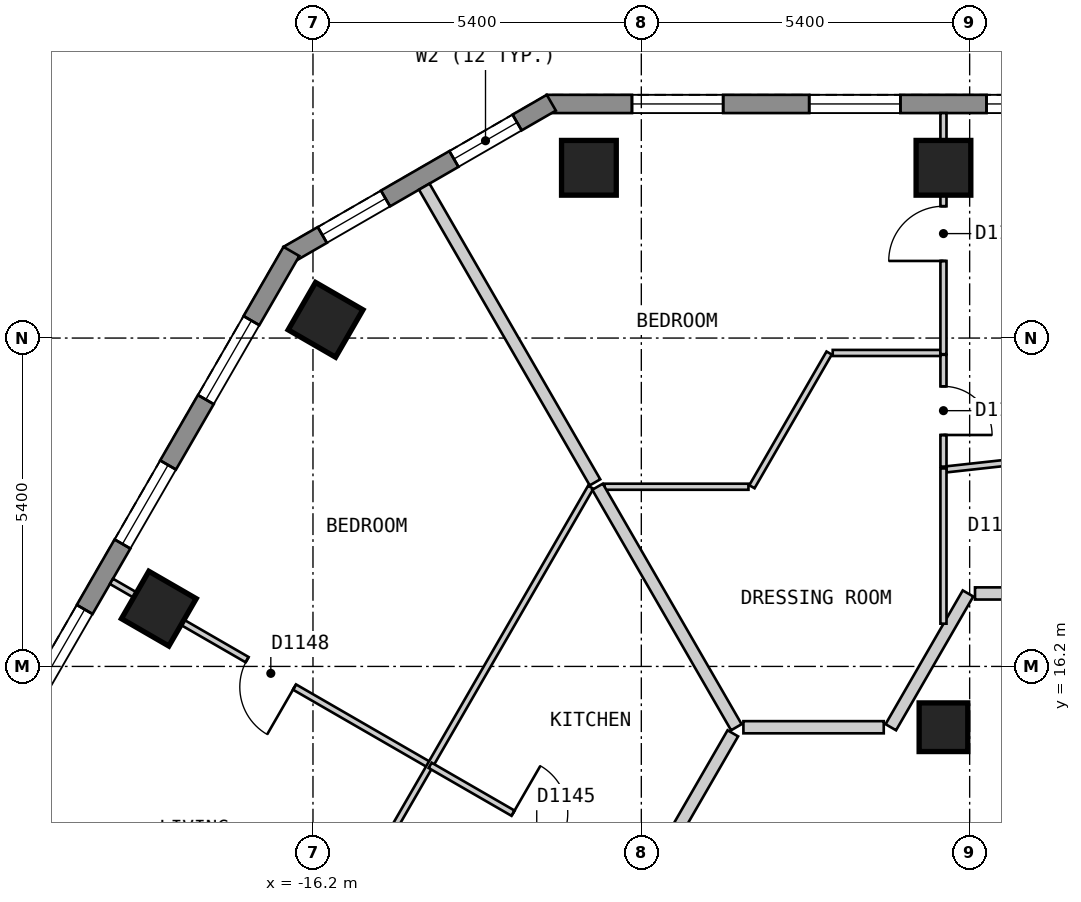
"""IFC4 building model, lengths in metres.
Left out: names, types, materials, properties, quantities, classifications, styles, units other than length and angle.
Written with IfcOpenShell. Run it as: python <this file> out.ifc"""

import sys

from ifc_helpers import new_model, si_unit, direction, frame, frame_2d, origin, origin_2d, place, context, subcontext, project, spatial, polyline, rectangle, outline, extrude, element, fill, save


model = new_model("IFC4")
c1 = context("Model", 3, precision=1e-05, world=origin(), true_north=direction((0.0, 1.0)))
c2 = subcontext(c1, "Body", "Model", "MODEL_VIEW")
j1 = project(units=[si_unit("LENGTHUNIT", "METRE"), si_unit("PLANEANGLEUNIT", "RADIAN")], contexts=[c1])
p1 = place(None, origin())
s1 = spatial("IfcSite", under=j1, at=p1, CompositionType="ELEMENT")
p2 = place(p1, origin())
s2 = spatial("IfcBuilding", under=s1, at=p2, CompositionType="ELEMENT")
p3 = place(p2, frame((0.0, 0.0, 138.6)))
s3 = spatial("IfcBuildingStorey", under=s2, at=p3, CompositionType="ELEMENT", Elevation=138.6)
for number, where, z_axis, x_axis in (
    (1, (-5.831, 24.4, 0.0), (0.0, 0.0, 1.0), (-1.0, 0.0, 0.0)),
    (2, (-11.662, 24.4, 0.0), (0.0, 0.0, 1.0), (-1.0, 0.0, 0.0)),
    (3, (-15.993, 21.9, 0.0), (0.0, 0.0, 1.0), (-0.5, -0.866, 0.0)),
    (4, (-18.735, 17.15, 0.0), (0.0, 0.0, 1.0), (-0.5, -0.866, 0.0)),
):
    element("IfcColumn", number, at=place(p3, frame(where, z_axis=z_axis, x_axis=x_axis)), inside=s3, PredefinedType="COLUMN", context=c2, shape_type="SweptSolid", body=[
        extrude(rectangle(XDim=0.9, YDim=0.9, at=origin_2d()), origin(), (0.0, 0.0, 1.0), 3.0),
    ])
p4 = place(p3, frame((-5.831, 15.2, 0.0), z_axis=(0.0, 0.0, 1.0), x_axis=(-1.0, 0.0, 0.0)))
e5 = element("IfcColumn", 5, at=p4, inside=s3, PredefinedType="COLUMN", context=c2, shape_type="SweptSolid", body=[
    extrude(rectangle(XDim=0.8, YDim=0.8, at=origin_2d()), origin(), (0.0, 0.0, 1.0), 3.0),
])
p5 = place(p3, frame((12.355, 25.45, 0.0), z_axis=(0.0, 0.0, 1.0), x_axis=(-1.0, 0.0, 0.0)))
e6 = element("IfcWall", 6, at=p5, inside=s3, PredefinedType="SOLIDWALL", context=c2, shape_type="SweptSolid", body=[
    extrude(outline(polyline([(0.0, -0.15), (24.71, -0.15), (24.63, 0.15), (0.08, 0.15), (0.0, -0.15)])), origin(), (0.0, 0.0, 1.0), 2.7),
])
p6 = place(p5, frame((1.401, 0.0, 0.15)))
e7 = element("IfcOpeningElement", 7, at=p6, cuts=e6, PredefinedType="OPENING", context=c2, shape_type="SweptSolid", body=[
    extrude(rectangle(XDim=1.5, YDim=2.1, at=frame_2d((0.75, 1.05))), frame((0.0, 0.16, 0.0), z_axis=(0.0, -1.0, 0.0), x_axis=(1.0, 0.0, 0.0)), (0.0, 0.0, 1.0), 0.32),
])
p7 = place(p5, frame((4.316, 0.0, 0.15)))
e8 = element("IfcOpeningElement", 8, at=p7, cuts=e6, PredefinedType="OPENING", context=c2, shape_type="SweptSolid", body=[
    extrude(rectangle(XDim=1.5, YDim=2.1, at=frame_2d((0.75, 1.05))), frame((0.0, 0.16, 0.0), z_axis=(0.0, -1.0, 0.0), x_axis=(1.0, 0.0, 0.0)), (0.0, 0.0, 1.0), 0.32),
])
p8 = place(p5, frame((7.232, 0.0, 0.15)))
e9 = element("IfcOpeningElement", 9, at=p8, cuts=e6, PredefinedType="OPENING", context=c2, shape_type="SweptSolid", body=[
    extrude(rectangle(XDim=1.5, YDim=2.1, at=frame_2d((0.75, 1.05))), frame((0.0, 0.16, 0.0), z_axis=(0.0, -1.0, 0.0), x_axis=(1.0, 0.0, 0.0)), (0.0, 0.0, 1.0), 0.32),
])
p9 = place(p5, frame((10.147, 0.0, 0.15)))
e10 = element("IfcOpeningElement", 10, at=p9, cuts=e6, PredefinedType="OPENING", context=c2, shape_type="SweptSolid", body=[
    extrude(rectangle(XDim=1.5, YDim=2.1, at=frame_2d((0.75, 1.05))), frame((0.0, 0.16, 0.0), z_axis=(0.0, -1.0, 0.0), x_axis=(1.0, 0.0, 0.0)), (0.0, 0.0, 1.0), 0.32),
])
p10 = place(p5, frame((13.063, 0.0, 0.15)))
e11 = element("IfcOpeningElement", 11, at=p10, cuts=e6, PredefinedType="OPENING", context=c2, shape_type="SweptSolid", body=[
    extrude(rectangle(XDim=1.5, YDim=2.1, at=frame_2d((0.75, 1.05))), frame((0.0, 0.16, 0.0), z_axis=(0.0, -1.0, 0.0), x_axis=(1.0, 0.0, 0.0)), (0.0, 0.0, 1.0), 0.32),
])
p11 = place(p5, frame((15.978, 0.0, 0.15)))
e12 = element("IfcOpeningElement", 12, at=p11, cuts=e6, PredefinedType="OPENING", context=c2, shape_type="SweptSolid", body=[
    extrude(rectangle(XDim=1.5, YDim=2.1, at=frame_2d((0.75, 1.05))), frame((0.0, 0.16, 0.0), z_axis=(0.0, -1.0, 0.0), x_axis=(1.0, 0.0, 0.0)), (0.0, 0.0, 1.0), 0.32),
])
p12 = place(p5, frame((18.894, 0.0, 0.15)))
e13 = element("IfcOpeningElement", 13, at=p12, cuts=e6, PredefinedType="OPENING", context=c2, shape_type="SweptSolid", body=[
    extrude(rectangle(XDim=1.5, YDim=2.1, at=frame_2d((0.75, 1.05))), frame((0.0, 0.16, 0.0), z_axis=(0.0, -1.0, 0.0), x_axis=(1.0, 0.0, 0.0)), (0.0, 0.0, 1.0), 0.32),
])
p13 = place(p5, frame((21.809, 0.0, 0.15)))
e14 = element("IfcOpeningElement", 14, at=p13, cuts=e6, PredefinedType="OPENING", context=c2, shape_type="SweptSolid", body=[
    extrude(rectangle(XDim=1.5, YDim=2.1, at=frame_2d((0.75, 1.05))), frame((0.0, 0.16, 0.0), z_axis=(0.0, -1.0, 0.0), x_axis=(1.0, 0.0, 0.0)), (0.0, 0.0, 1.0), 0.32),
])
p14 = place(p3, frame((-12.28, 25.47, 0.0), z_axis=(0.0, 0.0, 1.0), x_axis=(-0.866022959057, -0.500004234368, 0.0)))
e15 = element("IfcWall", 15, at=p14, inside=s3, PredefinedType="SOLIDWALL", context=c2, shape_type="SweptSolid", body=[
    extrude(outline(polyline([(0.0, -0.15), (5.0, -0.15), (4.92, 0.15), (0.08, 0.15), (0.0, -0.15)])), origin(), (0.0, 0.0, 1.0), 2.7),
])
p15 = place(p14, frame((0.65, 0.0, 0.15)))
e16 = element("IfcOpeningElement", 16, at=p15, cuts=e15, PredefinedType="OPENING", context=c2, shape_type="SweptSolid", body=[
    extrude(rectangle(XDim=1.2, YDim=2.1, at=frame_2d((0.6, 1.05))), frame((0.0, 0.16, 0.0), z_axis=(0.0, -1.0, 0.0), x_axis=(1.0, 0.0, 0.0)), (0.0, 0.0, 1.0), 0.32),
])
p16 = place(p14, frame((3.149, 0.0, 0.15)))
e17 = element("IfcOpeningElement", 17, at=p16, cuts=e15, PredefinedType="OPENING", context=c2, shape_type="SweptSolid", body=[
    extrude(rectangle(XDim=1.2, YDim=2.1, at=frame_2d((0.6, 1.05))), frame((0.0, 0.16, 0.0), z_axis=(0.0, -1.0, 0.0), x_axis=(1.0, 0.0, 0.0)), (0.0, 0.0, 1.0), 0.32),
])
p17 = place(p3, frame((-16.555, 23.025, 0.0), z_axis=(0.0, 0.0, 1.0), x_axis=(-0.500020536353, -0.866013546791, 0.0)))
e18 = element("IfcWall", 18, at=p17, inside=s3, PredefinedType="SOLIDWALL", context=c2, shape_type="SweptSolid", body=[
    extrude(outline(polyline([(0.0, -0.15), (23.325, -0.15), (23.245, 0.15), (0.08, 0.15), (0.0, -0.15)])), origin(), (0.0, 0.0, 1.0), 2.7),
])
p18 = place(p17, frame((1.314, 0.0, 0.15)))
e19 = element("IfcOpeningElement", 19, at=p18, cuts=e18, PredefinedType="OPENING", context=c2, shape_type="SweptSolid", body=[
    extrude(rectangle(XDim=1.5, YDim=2.1, at=frame_2d((0.75, 1.05))), frame((0.0, 0.16, 0.0), z_axis=(0.0, -1.0, 0.0), x_axis=(1.0, 0.0, 0.0)), (0.0, 0.0, 1.0), 0.32),
])
p19 = place(p17, frame((4.056, 0.0, 0.15)))
e20 = element("IfcOpeningElement", 20, at=p19, cuts=e18, PredefinedType="OPENING", context=c2, shape_type="SweptSolid", body=[
    extrude(rectangle(XDim=1.5, YDim=2.1, at=frame_2d((0.75, 1.05))), frame((0.0, 0.16, 0.0), z_axis=(0.0, -1.0, 0.0), x_axis=(1.0, 0.0, 0.0)), (0.0, 0.0, 1.0), 0.32),
])
p20 = place(p17, frame((6.799, 0.0, 0.15)))
e21 = element("IfcOpeningElement", 21, at=p20, cuts=e18, PredefinedType="OPENING", context=c2, shape_type="SweptSolid", body=[
    extrude(rectangle(XDim=1.5, YDim=2.1, at=frame_2d((0.75, 1.05))), frame((0.0, 0.16, 0.0), z_axis=(0.0, -1.0, 0.0), x_axis=(1.0, 0.0, 0.0)), (0.0, 0.0, 1.0), 0.32),
])
p21 = place(p17, frame((9.541, 0.0, 0.15)))
e22 = element("IfcOpeningElement", 22, at=p21, cuts=e18, PredefinedType="OPENING", context=c2, shape_type="SweptSolid", body=[
    extrude(rectangle(XDim=1.5, YDim=2.1, at=frame_2d((0.75, 1.05))), frame((0.0, 0.16, 0.0), z_axis=(0.0, -1.0, 0.0), x_axis=(1.0, 0.0, 0.0)), (0.0, 0.0, 1.0), 0.32),
])
p22 = place(p17, frame((12.285, 0.0, 0.15)))
e23 = element("IfcOpeningElement", 23, at=p22, cuts=e18, PredefinedType="OPENING", context=c2, shape_type="SweptSolid", body=[
    extrude(rectangle(XDim=1.5, YDim=2.1, at=frame_2d((0.75, 1.05))), frame((0.0, 0.16, 0.0), z_axis=(0.0, -1.0, 0.0), x_axis=(1.0, 0.0, 0.0)), (0.0, 0.0, 1.0), 0.32),
])
p23 = place(p17, frame((15.027, 0.0, 0.15)))
e24 = element("IfcOpeningElement", 24, at=p23, cuts=e18, PredefinedType="OPENING", context=c2, shape_type="SweptSolid", body=[
    extrude(rectangle(XDim=1.5, YDim=2.1, at=frame_2d((0.75, 1.05))), frame((0.0, 0.16, 0.0), z_axis=(0.0, -1.0, 0.0), x_axis=(1.0, 0.0, 0.0)), (0.0, 0.0, 1.0), 0.32),
])
p24 = place(p17, frame((17.769, 0.0, 0.15)))
e25 = element("IfcOpeningElement", 25, at=p24, cuts=e18, PredefinedType="OPENING", context=c2, shape_type="SweptSolid", body=[
    extrude(rectangle(XDim=1.5, YDim=2.1, at=frame_2d((0.75, 1.05))), frame((0.0, 0.16, 0.0), z_axis=(0.0, -1.0, 0.0), x_axis=(1.0, 0.0, 0.0)), (0.0, 0.0, 1.0), 0.32),
])
p25 = place(p17, frame((20.512, 0.0, 0.15)))
e26 = element("IfcOpeningElement", 26, at=p25, cuts=e18, PredefinedType="OPENING", context=c2, shape_type="SweptSolid", body=[
    extrude(rectangle(XDim=1.5, YDim=2.1, at=frame_2d((0.75, 1.05))), frame((0.0, 0.16, 0.0), z_axis=(0.0, -1.0, 0.0), x_axis=(1.0, 0.0, 0.0)), (0.0, 0.0, 1.0), 0.32),
])
p26 = place(p3, frame((-9.121, 15.2, 0.0), z_axis=(0.0, 0.0, 1.0), x_axis=(1.0, 0.0, 0.0)))
e27 = element("IfcWall", 27, at=p26, inside=s3, PredefinedType="PARTITIONING", context=c2, shape_type="SweptSolid", body=[
    extrude(rectangle(XDim=2.308, YDim=0.2, at=frame_2d((1.154, 0.0))), origin(), (0.0, 0.0, 1.0), 2.7),
])
p27 = place(p3, frame((-5.312, 17.4, 0.0), z_axis=(0.0, 0.0, 1.0), x_axis=(1.0, 0.0, 0.0)))
e28 = element("IfcWall", 28, at=p27, inside=s3, PredefinedType="PARTITIONING", context=c2, shape_type="SweptSolid", body=[
    extrude(rectangle(XDim=10.739, YDim=0.2, at=frame_2d((5.37, 0.0))), origin(), (0.0, 0.0, 1.0), 2.7),
])
p28 = place(p27, frame((7.538, 0.0, 0.0)))
e29 = element("IfcOpeningElement", 29, at=p28, cuts=e28, PredefinedType="OPENING", context=c2, shape_type="SweptSolid", body=[
    extrude(rectangle(XDim=1.0, YDim=2.1, at=frame_2d((0.5, 1.05))), frame((0.0, 0.11, 0.0), z_axis=(0.0, -1.0, 0.0), x_axis=(1.0, 0.0, 0.0)), (0.0, 0.0, 1.0), 0.22),
])
p29 = place(p27, frame((1.864, 0.0, 0.0)))
e30 = element("IfcOpeningElement", 30, at=p29, cuts=e28, PredefinedType="OPENING", context=c2, shape_type="SweptSolid", body=[
    extrude(rectangle(XDim=1.0, YDim=2.1, at=frame_2d((0.5, 1.05))), frame((0.0, 0.11, 0.0), z_axis=(0.0, -1.0, 0.0), x_axis=(1.0, 0.0, 0.0)), (0.0, 0.0, 1.0), 0.22),
])
p30 = place(p3, frame((-6.697, 15.2, 0.0), z_axis=(0.0, 0.0, 1.0), x_axis=(0.499963722229, 0.866046347752, 0.0)))
e31 = element("IfcWall", 31, at=p30, inside=s3, PredefinedType="PARTITIONING", context=c2, shape_type="SweptSolid", body=[
    extrude(rectangle(XDim=2.54, YDim=0.2, at=frame_2d((1.27, 0.0))), origin(), (0.0, 0.0, 1.0), 2.7),
])
p31 = place(p3, frame((-17.724, 0.5, 0.0), z_axis=(0.0, 0.0, 1.0), x_axis=(0.499992388462, 0.866029798263, 0.0)))
e32 = element("IfcWall", 32, at=p31, inside=s3, PredefinedType="PARTITIONING", context=c2, shape_type="SweptSolid", body=[
    extrude(rectangle(XDim=16.859, YDim=0.2, at=frame_2d((8.429, 0.0))), origin(), (0.0, 0.0, 1.0), 2.7),
])
p32 = place(p31, frame((10.672, 0.0, 0.0)))
e33 = element("IfcOpeningElement", 33, at=p32, cuts=e32, PredefinedType="OPENING", context=c2, shape_type="SweptSolid", body=[
    extrude(rectangle(XDim=1.0, YDim=2.1, at=frame_2d((0.5, 1.05))), frame((0.0, 0.11, 0.0), z_axis=(0.0, -1.0, 0.0), x_axis=(1.0, 0.0, 0.0)), (0.0, 0.0, 1.0), 0.22),
])
p33 = place(p3, frame((-5.831, 21.325, 0.0), z_axis=(0.0, 0.0, 1.0), x_axis=(0.0, -1.0, 0.0)))
e34 = element("IfcWall", 34, at=p33, inside=s3, PredefinedType="PARTITIONING", context=c2, shape_type="SweptSolid", body=[
    extrude(rectangle(XDim=1.839, YDim=0.1, at=frame_2d((0.919, 0.0))), origin(), (0.0, 0.0, 1.0), 2.7),
])
p34 = place(p33, frame((0.519, 0.0, 0.0)))
e35 = element("IfcOpeningElement", 35, at=p34, cuts=e34, PredefinedType="OPENING", context=c2, shape_type="SweptSolid", body=[
    extrude(rectangle(XDim=0.8, YDim=2.1, at=frame_2d((0.4, 1.05))), frame((0.0, 0.06, 0.0), z_axis=(0.0, -1.0, 0.0), x_axis=(1.0, 0.0, 0.0)), (0.0, 0.0, 1.0), 0.12),
])
p35 = place(p3, frame((-19.514, 17.599, 0.0), z_axis=(0.0, 0.0, 1.0), x_axis=(0.866007554612, -0.500030914399, 0.0)))
e36 = element("IfcWall", 36, at=p35, inside=s3, PredefinedType="PARTITIONING", context=c2, shape_type="SweptSolid", body=[
    extrude(rectangle(XDim=6.052, YDim=0.1, at=frame_2d((3.026, 0.0))), origin(), (0.0, 0.0, 1.0), 2.7),
])
p36 = place(p35, frame((2.576, 0.0, 0.0)))
e37 = element("IfcOpeningElement", 37, at=p36, cuts=e36, PredefinedType="OPENING", context=c2, shape_type="SweptSolid", body=[
    extrude(rectangle(XDim=0.9, YDim=2.1, at=frame_2d((0.45, 1.05))), frame((0.0, 0.06, 0.0), z_axis=(0.0, -1.0, 0.0), x_axis=(1.0, 0.0, 0.0)), (0.0, 0.0, 1.0), 0.12),
])
p37 = place(p3, frame((-11.405, 19.155, 0.0), z_axis=(0.0, 0.0, 1.0), x_axis=(1.0, 0.0, 0.0)))
e38 = element("IfcWall", 38, at=p37, inside=s3, PredefinedType="PARTITIONING", context=c2, shape_type="SweptSolid", body=[
    extrude(rectangle(XDim=2.367, YDim=0.1, at=frame_2d((1.184, 0.0))), origin(), (0.0, 0.0, 1.0), 2.7),
])
p38 = place(p3, frame((-7.652, 21.355, 0.0), z_axis=(0.0, 0.0, 1.0), x_axis=(1.0, 0.0, 0.0)))
e39 = element("IfcWall", 39, at=p38, inside=s3, PredefinedType="PARTITIONING", context=c2, shape_type="SweptSolid", body=[
    extrude(rectangle(XDim=1.771, YDim=0.1, at=frame_2d((0.885, 0.0))), origin(), (0.0, 0.0, 1.0), 2.7),
])
p39 = place(p3, frame((-8.981, 19.155, 0.0), z_axis=(0.0, 0.0, 1.0), x_axis=(0.500130227609, 0.865950203783, 0.0)))
e40 = element("IfcWall", 40, at=p39, inside=s3, PredefinedType="PARTITIONING", context=c2, shape_type="SweptSolid", body=[
    extrude(rectangle(XDim=2.539, YDim=0.1, at=frame_2d((1.27, 0.0))), origin(), (0.0, 0.0, 1.0), 2.7),
])
p40 = place(p3, frame((-22.398, 0.499, 0.0), z_axis=(0.0, 0.0, 1.0), x_axis=(0.499981561717, 0.866036048871, 0.0)))
e41 = element("IfcWall", 41, at=p40, inside=s3, PredefinedType="PARTITIONING", context=c2, shape_type="SweptSolid", body=[
    extrude(rectangle(XDim=21.532, YDim=0.1, at=frame_2d((10.766, 0.0))), origin(), (0.0, 0.0, 1.0), 2.7),
])
p41 = place(p40, frame((13.049, 0.0, 0.0)))
e42 = element("IfcOpeningElement", 42, at=p41, cuts=e41, PredefinedType="OPENING", context=c2, shape_type="SweptSolid", body=[
    extrude(rectangle(XDim=0.9, YDim=2.1, at=frame_2d((0.45, 1.05))), frame((0.0, 0.06, 0.0), z_axis=(0.0, -1.0, 0.0), x_axis=(1.0, 0.0, 0.0)), (0.0, 0.0, 1.0), 0.12),
])
p42 = place(p40, frame((2.183, 0.0, 0.0)))
e43 = element("IfcOpeningElement", 43, at=p42, cuts=e41, PredefinedType="OPENING", context=c2, shape_type="SweptSolid", body=[
    extrude(rectangle(XDim=0.8, YDim=2.1, at=frame_2d((0.4, 1.05))), frame((0.0, 0.06, 0.0), z_axis=(0.0, -1.0, 0.0), x_axis=(1.0, 0.0, 0.0)), (0.0, 0.0, 1.0), 0.12),
])
p43 = place(p3, frame((-5.781, 19.441, 0.0), z_axis=(0.0, 0.0, 1.0), x_axis=(0.994005576935, 0.109329378588, 0.0)))
e44 = element("IfcWall", 44, at=p43, inside=s3, PredefinedType="PARTITIONING", context=c2, shape_type="SweptSolid", body=[
    extrude(rectangle(XDim=3.477, YDim=0.1, at=frame_2d((1.738, 0.0))), origin(), (0.0, 0.0, 1.0), 2.7),
])
p44 = place(p3, frame((-5.831, 16.903, 0.0), z_axis=(0.0, 0.0, 1.0), x_axis=(0.0, 1.0, 0.0)))
e45 = element("IfcWall", 45, at=p44, inside=s3, PredefinedType="PARTITIONING", context=c2, shape_type="SweptSolid", body=[
    extrude(rectangle(XDim=2.553, YDim=0.1, at=frame_2d((1.276, 0.0))), origin(), (0.0, 0.0, 1.0), 2.7),
])
p45 = place(p3, frame((-5.831, 21.335, 0.0), z_axis=(0.0, 0.0, 1.0), x_axis=(0.0, 1.0, 0.0)))
e46 = element("IfcWall", 46, at=p45, inside=s3, PredefinedType="PARTITIONING", context=c2, shape_type="SweptSolid", body=[
    extrude(rectangle(XDim=3.965, YDim=0.1, at=frame_2d((1.982, 0.0))), origin(), (0.0, 0.0, 1.0), 2.7),
])
p46 = place(p45, frame((1.533, 0.0, 0.0)))
e47 = element("IfcOpeningElement", 47, at=p46, cuts=e46, PredefinedType="OPENING", context=c2, shape_type="SweptSolid", body=[
    extrude(rectangle(XDim=0.9, YDim=2.1, at=frame_2d((0.45, 1.05))), frame((0.0, 0.06, 0.0), z_axis=(0.0, -1.0, 0.0), x_axis=(1.0, 0.0, 0.0)), (0.0, 0.0, 1.0), 0.12),
])
p47 = place(p3, frame((-14.37, 24.09, 0.0), z_axis=(0.0, 0.0, 1.0), x_axis=(0.500057386422, -0.865992269183, 0.0)))
e48 = element("IfcWall", 48, at=p47, inside=s3, PredefinedType="PARTITIONING", context=c2, shape_type="SweptSolid", body=[
    extrude(rectangle(XDim=5.615, YDim=0.2, at=frame_2d((2.808, 0.0))), origin(), (0.0, 0.0, 1.0), 2.7),
])
p48 = place(p3, frame((-11.52, 19.155, 0.0), z_axis=(0.0, 0.0, 1.0), x_axis=(0.499916824138, -0.866073420066, 0.0)))
e49 = element("IfcWall", 49, at=p48, inside=s3, PredefinedType="PARTITIONING", context=c2, shape_type="SweptSolid", body=[
    extrude(rectangle(XDim=4.567, YDim=0.2, at=frame_2d((2.283, 0.0))), origin(), (0.0, 0.0, 1.0), 2.7),
])
p49 = place(p3, frame((-14.273, 14.573, 0.0), z_axis=(0.0, 0.0, 1.0), x_axis=(0.866138216955, -0.499804550929, 0.0)))
e50 = element("IfcWall", 50, at=p49, inside=s3, PredefinedType="PARTITIONING", context=c2, shape_type="SweptSolid", body=[
    extrude(rectangle(XDim=3.947, YDim=0.1, at=frame_2d((1.974, 0.0))), origin(), (0.0, 0.0, 1.0), 2.7),
])
p50 = place(p49, frame((1.574, 0.0, 0.0)))
e51 = element("IfcOpeningElement", 51, at=p50, cuts=e50, PredefinedType="OPENING", context=c2, shape_type="SweptSolid", body=[
    extrude(rectangle(XDim=0.9, YDim=2.1, at=frame_2d((0.45, 1.05))), frame((0.0, 0.06, 0.0), z_axis=(0.0, -1.0, 0.0), x_axis=(1.0, 0.0, 0.0)), (0.0, 0.0, 1.0), 0.12),
])
p51 = place(p11, origin())
e52 = element("IfcWindow", 52, at=p51, inside=s3, PartitioningType="SINGLE_PANEL", PredefinedType="WINDOW", context=c2, shape_type="SweptSolid", body=[
    extrude(rectangle(XDim=1.5, YDim=2.1, at=frame_2d((0.75, 1.05))), frame((0.0, 0.03, 0.0), z_axis=(0.0, -1.0, 0.0), x_axis=(1.0, 0.0, 0.0)), (0.0, 0.0, 1.0), 0.06),
])
fill(e12, e52)
p52 = place(p12, origin())
e53 = element("IfcWindow", 53, at=p52, inside=s3, PartitioningType="SINGLE_PANEL", PredefinedType="WINDOW", context=c2, shape_type="SweptSolid", body=[
    extrude(rectangle(XDim=1.5, YDim=2.1, at=frame_2d((0.75, 1.05))), frame((0.0, 0.03, 0.0), z_axis=(0.0, -1.0, 0.0), x_axis=(1.0, 0.0, 0.0)), (0.0, 0.0, 1.0), 0.06),
])
fill(e13, e53)
p53 = place(p13, origin())
e54 = element("IfcWindow", 54, at=p53, inside=s3, PartitioningType="SINGLE_PANEL", PredefinedType="WINDOW", context=c2, shape_type="SweptSolid", body=[
    extrude(rectangle(XDim=1.5, YDim=2.1, at=frame_2d((0.75, 1.05))), frame((0.0, 0.03, 0.0), z_axis=(0.0, -1.0, 0.0), x_axis=(1.0, 0.0, 0.0)), (0.0, 0.0, 1.0), 0.06),
])
fill(e14, e54)
p54 = place(p15, origin())
e55 = element("IfcWindow", 55, at=p54, inside=s3, PartitioningType="SINGLE_PANEL", PredefinedType="WINDOW", context=c2, shape_type="SweptSolid", body=[
    extrude(rectangle(XDim=1.2, YDim=2.1, at=frame_2d((0.6, 1.05))), frame((0.0, 0.03, 0.0), z_axis=(0.0, -1.0, 0.0), x_axis=(1.0, 0.0, 0.0)), (0.0, 0.0, 1.0), 0.06),
])
fill(e16, e55)
p55 = place(p16, origin())
e56 = element("IfcWindow", 56, at=p55, inside=s3, PartitioningType="SINGLE_PANEL", PredefinedType="WINDOW", context=c2, shape_type="SweptSolid", body=[
    extrude(rectangle(XDim=1.2, YDim=2.1, at=frame_2d((0.6, 1.05))), frame((0.0, 0.03, 0.0), z_axis=(0.0, -1.0, 0.0), x_axis=(1.0, 0.0, 0.0)), (0.0, 0.0, 1.0), 0.06),
])
fill(e17, e56)
p56 = place(p18, origin())
e57 = element("IfcWindow", 57, at=p56, inside=s3, PartitioningType="SINGLE_PANEL", PredefinedType="WINDOW", context=c2, shape_type="SweptSolid", body=[
    extrude(rectangle(XDim=1.5, YDim=2.1, at=frame_2d((0.75, 1.05))), frame((0.0, 0.03, 0.0), z_axis=(0.0, -1.0, 0.0), x_axis=(1.0, 0.0, 0.0)), (0.0, 0.0, 1.0), 0.06),
])
fill(e19, e57)
p57 = place(p19, origin())
e58 = element("IfcWindow", 58, at=p57, inside=s3, PartitioningType="SINGLE_PANEL", PredefinedType="WINDOW", context=c2, shape_type="SweptSolid", body=[
    extrude(rectangle(XDim=1.5, YDim=2.1, at=frame_2d((0.75, 1.05))), frame((0.0, 0.03, 0.0), z_axis=(0.0, -1.0, 0.0), x_axis=(1.0, 0.0, 0.0)), (0.0, 0.0, 1.0), 0.06),
])
fill(e20, e58)
p58 = place(p20, origin())
e59 = element("IfcWindow", 59, at=p58, inside=s3, PartitioningType="SINGLE_PANEL", PredefinedType="WINDOW", context=c2, shape_type="SweptSolid", body=[
    extrude(rectangle(XDim=1.5, YDim=2.1, at=frame_2d((0.75, 1.05))), frame((0.0, 0.03, 0.0), z_axis=(0.0, -1.0, 0.0), x_axis=(1.0, 0.0, 0.0)), (0.0, 0.0, 1.0), 0.06),
])
fill(e21, e59)
p59 = place(p46, origin())
e60 = element("IfcDoor", 60, at=p59, inside=s3, OperationType="SINGLE_SWING_LEFT", PredefinedType="DOOR", context=c2, shape_type="SweptSolid", body=[
    extrude(rectangle(XDim=0.9, YDim=2.1, at=frame_2d((0.45, 1.05))), frame((0.0, 0.025, 0.0), z_axis=(0.0, -1.0, 0.0), x_axis=(1.0, 0.0, 0.0)), (0.0, 0.0, 1.0), 0.05),
])
fill(e47, e60)
p60 = place(p34, origin())
e61 = element("IfcDoor", 61, at=p60, inside=s3, OperationType="SINGLE_SWING_RIGHT", PredefinedType="DOOR", context=c2, shape_type="SweptSolid", body=[
    extrude(rectangle(XDim=0.8, YDim=2.1, at=frame_2d((0.4, 1.05))), frame((0.0, 0.025, 0.0), z_axis=(0.0, -1.0, 0.0), x_axis=(1.0, 0.0, 0.0)), (0.0, 0.0, 1.0), 0.05),
])
fill(e35, e61)
p61 = place(p50, origin())
e62 = element("IfcDoor", 62, at=p61, inside=s3, OperationType="SINGLE_SWING_LEFT", PredefinedType="DOOR", context=c2, shape_type="SweptSolid", body=[
    extrude(rectangle(XDim=0.9, YDim=2.1, at=frame_2d((0.45, 1.05))), frame((0.0, 0.025, 0.0), z_axis=(0.0, -1.0, 0.0), x_axis=(1.0, 0.0, 0.0)), (0.0, 0.0, 1.0), 0.05),
])
fill(e51, e62)
p62 = place(p36, origin())
e63 = element("IfcDoor", 63, at=p62, inside=s3, OperationType="SINGLE_SWING_RIGHT", PredefinedType="DOOR", context=c2, shape_type="SweptSolid", body=[
    extrude(rectangle(XDim=0.9, YDim=2.1, at=frame_2d((0.45, 1.05))), frame((0.0, 0.025, 0.0), z_axis=(0.0, -1.0, 0.0), x_axis=(1.0, 0.0, 0.0)), (0.0, 0.0, 1.0), 0.05),
])
fill(e37, e63)
save(model, sys.argv[1])
